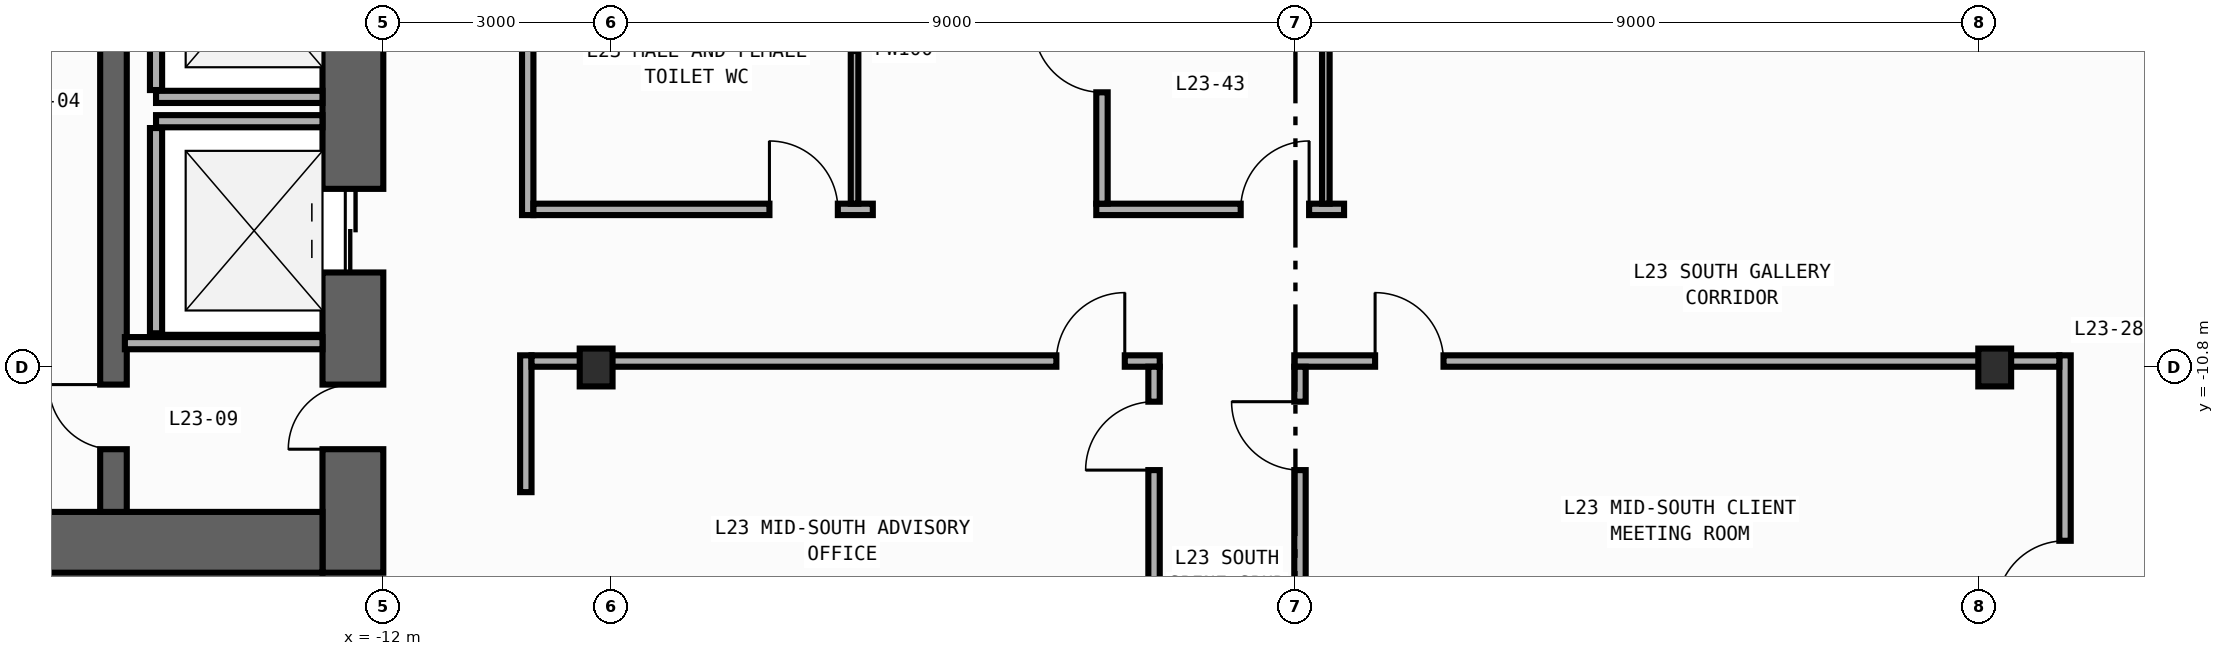
"""IFC4 building model, lengths in metres.
Left out: names, types, materials, properties, quantities, classifications, styles, units other than length and angle.
Written with IfcOpenShell. Run it as: python <this file> out.ifc"""

import sys

from ifc_helpers import new_model, si_unit, direction, frame, frame_2d, origin, origin_2d, place, context, subcontext, project, spatial, rectangle, i_section, extrude, element, fill, save


model = new_model("IFC4")
c1 = context("Model", 3, precision=1e-05, world=origin(), true_north=direction((0.0, 1.0)))
c2 = subcontext(c1, "Body", "Model", "MODEL_VIEW")
j1 = project(units=[si_unit("LENGTHUNIT", "METRE"), si_unit("PLANEANGLEUNIT", "RADIAN")], contexts=[c1])
p1 = place(None, origin())
s1 = spatial("IfcSite", under=j1, at=p1, CompositionType="ELEMENT")
p2 = place(p1, origin())
s2 = spatial("IfcBuilding", under=s1, at=p2, CompositionType="ELEMENT")
p3 = place(p2, frame((0.0, 0.0, 101.6)))
s3 = spatial("IfcBuildingStorey", under=s2, at=p3, CompositionType="ELEMENT", Elevation=101.6)
p4 = place(p3, frame((-12.4, -13.5, 0.0), z_axis=(0.0, 0.0, 1.0), x_axis=(0.0, 1.0, 0.0)))
e1 = element("IfcWall", 1, at=p4, inside=s3, PredefinedType="SHEAR", context=c2, shape_type="SweptSolid", body=[
    extrude(rectangle(XDim=27.0, YDim=0.8, at=frame_2d((13.5, 0.0))), origin(), (0.0, 0.0, 1.0), 3.94),
])
p5 = place(p4, frame((10.35, 0.0, 0.0)))
e2 = element("IfcOpeningElement", 2, at=p5, cuts=e1, PredefinedType="OPENING", context=c2, shape_type="SweptSolid", body=[
    extrude(rectangle(XDim=1.1, YDim=2.2, at=frame_2d((0.55, 1.1))), frame((0.0, 0.41, 0.0), z_axis=(0.0, -1.0, 0.0), x_axis=(1.0, 0.0, 0.0)), (0.0, 0.0, 1.0), 0.82),
])
p6 = place(p4, frame((7.15, 0.0, 0.0)))
e3 = element("IfcOpeningElement", 3, at=p6, cuts=e1, PredefinedType="OPENING", context=c2, shape_type="SweptSolid", body=[
    extrude(rectangle(XDim=1.1, YDim=2.2, at=frame_2d((0.55, 1.1))), frame((0.0, 0.41, 0.0), z_axis=(0.0, -1.0, 0.0), x_axis=(1.0, 0.0, 0.0)), (0.0, 0.0, 1.0), 0.82),
])
p7 = place(p4, frame((3.95, 0.0, 0.0)))
e4 = element("IfcOpeningElement", 4, at=p7, cuts=e1, PredefinedType="OPENING", context=c2, shape_type="SweptSolid", body=[
    extrude(rectangle(XDim=1.1, YDim=2.2, at=frame_2d((0.55, 1.1))), frame((0.0, 0.41, 0.0), z_axis=(0.0, -1.0, 0.0), x_axis=(1.0, 0.0, 0.0)), (0.0, 0.0, 1.0), 0.82),
])
p8 = place(p4, frame((15.175, 0.0, 0.0)))
e5 = element("IfcOpeningElement", 5, at=p8, cuts=e1, PredefinedType="OPENING", context=c2, shape_type="SweptSolid", body=[
    extrude(rectangle(XDim=0.85, YDim=2.1, at=frame_2d((0.425, 1.05))), frame((0.0, 0.41, 0.0), z_axis=(0.0, -1.0, 0.0), x_axis=(1.0, 0.0, 0.0)), (0.0, 0.0, 1.0), 0.82),
])
p9 = place(p4, frame((21.275, 0.0, 0.0)))
e6 = element("IfcOpeningElement", 6, at=p9, cuts=e1, PredefinedType="OPENING", context=c2, shape_type="SweptSolid", body=[
    extrude(rectangle(XDim=0.85, YDim=2.1, at=frame_2d((0.425, 1.05))), frame((0.0, 0.41, 0.0), z_axis=(0.0, -1.0, 0.0), x_axis=(1.0, 0.0, 0.0)), (0.0, 0.0, 1.0), 0.82),
])
p10 = place(p4, frame((12.725, 0.0, 0.0)))
e7 = element("IfcOpeningElement", 7, at=p10, cuts=e1, PredefinedType="OPENING", context=c2, shape_type="SweptSolid", body=[
    extrude(rectangle(XDim=1.15, YDim=2.2, at=frame_2d((0.575, 1.1))), frame((0.0, 0.41, 0.0), z_axis=(0.0, -1.0, 0.0), x_axis=(1.0, 0.0, 0.0)), (0.0, 0.0, 1.0), 0.82),
])
p11 = place(p4, frame((1.625, 0.0, 0.0)))
e8 = element("IfcOpeningElement", 8, at=p11, cuts=e1, PredefinedType="OPENING", context=c2, shape_type="SweptSolid", body=[
    extrude(rectangle(XDim=0.85, YDim=2.1, at=frame_2d((0.425, 1.05))), frame((0.0, 0.41, 0.0), z_axis=(0.0, -1.0, 0.0), x_axis=(1.0, 0.0, 0.0)), (0.0, 0.0, 1.0), 0.82),
])
p12 = place(p3, frame((-19.6, -13.1, 0.0), z_axis=(0.0, 0.0, 1.0), x_axis=(1.0, 0.0, 0.0)))
e9 = element("IfcWall", 9, at=p12, inside=s3, PredefinedType="SHEAR", context=c2, shape_type="SweptSolid", body=[
    extrude(rectangle(XDim=6.8, YDim=0.8, at=frame_2d((3.4, 0.0))), origin(), (0.0, 0.0, 1.0), 3.94),
])
p13 = place(p3, frame((-15.55, -12.7, 0.0), z_axis=(0.0, 0.0, 1.0), x_axis=(0.0, 1.0, 0.0)))
e10 = element("IfcWall", 10, at=p13, inside=s3, PredefinedType="SHEAR", context=c2, shape_type="SweptSolid", body=[
    extrude(rectangle(XDim=25.4, YDim=0.35, at=frame_2d((12.7, 0.0))), origin(), (0.0, 0.0, 1.0), 3.94),
])
p14 = place(p13, frame((11.925, 0.0, 0.0)))
e11 = element("IfcOpeningElement", 11, at=p14, cuts=e10, PredefinedType="OPENING", context=c2, shape_type="SweptSolid", body=[
    extrude(rectangle(XDim=1.15, YDim=2.2, at=frame_2d((0.575, 1.1))), frame((0.0, 0.185, 0.0), z_axis=(0.0, -1.0, 0.0), x_axis=(1.0, 0.0, 0.0)), (0.0, 0.0, 1.0), 0.37),
])
p15 = place(p13, frame((0.825, 0.0, 0.0)))
e12 = element("IfcOpeningElement", 12, at=p15, cuts=e10, PredefinedType="OPENING", context=c2, shape_type="SweptSolid", body=[
    extrude(rectangle(XDim=0.85, YDim=2.1, at=frame_2d((0.425, 1.05))), frame((0.0, 0.185, 0.0), z_axis=(0.0, -1.0, 0.0), x_axis=(1.0, 0.0, 0.0)), (0.0, 0.0, 1.0), 0.37),
])
for number, where, z_axis, x_axis in (
    (13, (-9.2, -10.8, 0.0), (0.0, 0.0, 1.0), (1.0, 0.0, 0.0)),
    (14, (9.2, -10.8, 0.0), (0.0, 0.0, 1.0), (1.0, 0.0, 0.0)),
):
    element("IfcColumn", number, at=place(p3, frame(where, z_axis=z_axis, x_axis=x_axis)), inside=s3, PredefinedType="COLUMN", context=c2, shape_type="SweptSolid", body=[
        extrude(i_section(OverallWidth=0.432, OverallDepth=0.498, WebThickness=0.045, FlangeThickness=0.07, FilletRadius=0.022, at=origin_2d()), origin(), (0.0, 0.0, 1.0), 4.2),
    ])
p16 = place(p3, frame((-14.99, -7.24, 0.0), z_axis=(0.0, 0.0, 1.0), x_axis=(1.0, 0.0, 0.0)))
e15 = element("IfcWall", 15, at=p16, inside=s3, PredefinedType="STANDARD", context=c2, shape_type="SweptSolid", body=[
    extrude(rectangle(XDim=2.19, YDim=0.16, at=frame_2d((1.095, 0.0))), origin(), (0.0, 0.0, 1.0), 3.94),
])
p17 = place(p3, frame((-14.99, -7.15, 0.0), z_axis=(0.0, 0.0, 1.0), x_axis=(0.0, 1.0, 0.0)))
e16 = element("IfcWall", 16, at=p17, inside=s3, PredefinedType="STANDARD", context=c2, shape_type="SweptSolid", body=[
    extrude(rectangle(XDim=2.7, YDim=0.16, at=frame_2d((1.35, 0.0))), origin(), (0.0, 0.0, 1.0), 3.94),
])
p18 = place(p3, frame((-14.99, -7.56, 0.0), z_axis=(0.0, 0.0, 1.0), x_axis=(1.0, 0.0, 0.0)))
e17 = element("IfcWall", 17, at=p18, inside=s3, PredefinedType="STANDARD", context=c2, shape_type="SweptSolid", body=[
    extrude(rectangle(XDim=2.19, YDim=0.16, at=frame_2d((1.095, 0.0))), origin(), (0.0, 0.0, 1.0), 3.94),
])
p19 = place(p3, frame((-14.99, -10.35, 0.0), z_axis=(0.0, 0.0, 1.0), x_axis=(0.0, 1.0, 0.0)))
e18 = element("IfcWall", 18, at=p19, inside=s3, PredefinedType="STANDARD", context=c2, shape_type="SweptSolid", body=[
    extrude(rectangle(XDim=2.7, YDim=0.16, at=frame_2d((1.35, 0.0))), origin(), (0.0, 0.0, 1.0), 3.94),
])
p20 = place(p3, frame((-15.4, -10.48, 0.0), z_axis=(0.0, 0.0, 1.0), x_axis=(1.0, 0.0, 0.0)))
e19 = element("IfcWall", 19, at=p20, inside=s3, PredefinedType="STANDARD", context=c2, shape_type="SweptSolid", body=[
    extrude(rectangle(XDim=2.6, YDim=0.16, at=frame_2d((1.3, 0.0))), origin(), (0.0, 0.0, 1.0), 3.94),
])
p21 = place(p3, frame((-10.1, -8.795, 0.0), z_axis=(0.0, 0.0, 1.0), x_axis=(0.0, 1.0, 0.0)))
e20 = element("IfcWall", 20, at=p21, inside=s3, PredefinedType="PARTITIONING", context=c2, shape_type="SweptSolid", body=[
    extrude(rectangle(XDim=4.275, YDim=0.15, at=frame_2d((2.137, 0.0))), origin(), (0.0, 0.0, 1.0), 3.94),
])
p22 = place(p21, frame((2.915, 0.0, 0.0)))
e21 = element("IfcOpeningElement", 21, at=p22, cuts=e20, PredefinedType="OPENING", context=c2, shape_type="SweptSolid", body=[
    extrude(rectangle(XDim=0.9, YDim=2.15, at=frame_2d((0.45, 1.075))), frame((0.0, 0.085, 0.0), z_axis=(0.0, -1.0, 0.0), x_axis=(1.0, 0.0, 0.0)), (0.0, 0.0, 1.0), 0.17),
])
p23 = place(p3, frame((-10.125, -12.44, 0.0), z_axis=(0.0, 0.0, 1.0), x_axis=(0.0, 1.0, 0.0)))
e22 = element("IfcWall", 22, at=p23, inside=s3, PredefinedType="PARTITIONING", context=c2, shape_type="SweptSolid", body=[
    extrude(rectangle(XDim=1.8, YDim=0.15, at=frame_2d((0.9, 0.0))), origin(), (0.0, 0.0, 1.0), 3.94),
])
p24 = place(p3, frame((10.125, -14.44, 0.0), z_axis=(0.0, 0.0, 1.0), x_axis=(0.0, 1.0, 0.0)))
e23 = element("IfcWall", 23, at=p24, inside=s3, PredefinedType="PARTITIONING", context=c2, shape_type="SweptSolid", body=[
    extrude(rectangle(XDim=3.8, YDim=0.15, at=frame_2d((1.9, 0.0))), origin(), (0.0, 0.0, 1.0), 3.94),
])
p25 = place(p24, frame((0.46, 0.0, 0.0)))
e24 = element("IfcOpeningElement", 24, at=p25, cuts=e23, PredefinedType="OPENING", context=c2, shape_type="SweptSolid", body=[
    extrude(rectangle(XDim=0.9, YDim=2.15, at=frame_2d((0.45, 1.075))), frame((0.0, 0.085, 0.0), z_axis=(0.0, -1.0, 0.0), x_axis=(1.0, 0.0, 0.0)), (0.0, 0.0, 1.0), 0.17),
])
p26 = place(p3, frame((-2.62, -8.72, 0.0), z_axis=(0.0, 0.0, 1.0), x_axis=(1.0, 0.0, 0.0)))
e25 = element("IfcWall", 25, at=p26, inside=s3, PredefinedType="PARTITIONING", context=c2, shape_type="SweptSolid", body=[
    extrude(rectangle(XDim=3.26, YDim=0.15, at=frame_2d((1.63, 0.0))), origin(), (0.0, 0.0, 1.0), 3.94),
])
p27 = place(p26, frame((1.9, 0.0, 0.0)))
e26 = element("IfcOpeningElement", 26, at=p27, cuts=e25, PredefinedType="OPENING", context=c2, shape_type="SweptSolid", body=[
    extrude(rectangle(XDim=0.9, YDim=2.15, at=frame_2d((0.45, 1.075))), frame((0.0, 0.085, 0.0), z_axis=(0.0, -1.0, 0.0), x_axis=(1.0, 0.0, 0.0)), (0.0, 0.0, 1.0), 0.17),
])
p28 = place(p3, frame((-10.025, -8.72, 0.0), z_axis=(0.0, 0.0, 1.0), x_axis=(1.0, 0.0, 0.0)))
e27 = element("IfcWall", 27, at=p28, inside=s3, PredefinedType="PARTITIONING", context=c2, shape_type="SweptSolid", body=[
    extrude(rectangle(XDim=4.465, YDim=0.15, at=frame_2d((2.232, 0.0))), origin(), (0.0, 0.0, 1.0), 3.94),
])
p29 = place(p28, frame((3.105, 0.0, 0.0)))
e28 = element("IfcOpeningElement", 28, at=p29, cuts=e27, PredefinedType="OPENING", context=c2, shape_type="SweptSolid", body=[
    extrude(rectangle(XDim=0.9, YDim=2.15, at=frame_2d((0.45, 1.075))), frame((0.0, 0.085, 0.0), z_axis=(0.0, -1.0, 0.0), x_axis=(1.0, 0.0, 0.0)), (0.0, 0.0, 1.0), 0.17),
])
p30 = place(p3, frame((-10.05, -10.715, 0.0), z_axis=(0.0, 0.0, 1.0), x_axis=(1.0, 0.0, 0.0)))
e29 = element("IfcWall", 29, at=p30, inside=s3, PredefinedType="PARTITIONING", context=c2, shape_type="SweptSolid", body=[
    extrude(rectangle(XDim=8.265, YDim=0.15, at=frame_2d((4.133, 0.0))), origin(), (0.0, 0.0, 1.0), 3.24),
])
p31 = place(p30, frame((6.905, 0.0, 0.0)))
e30 = element("IfcOpeningElement", 30, at=p31, cuts=e29, PredefinedType="OPENING", context=c2, shape_type="SweptSolid", body=[
    extrude(rectangle(XDim=0.9, YDim=2.15, at=frame_2d((0.45, 1.075))), frame((0.0, 0.085, 0.0), z_axis=(0.0, -1.0, 0.0), x_axis=(1.0, 0.0, 0.0)), (0.0, 0.0, 1.0), 0.17),
])
p32 = place(p3, frame((-0.015, -10.715, 0.0), z_axis=(0.0, 0.0, 1.0), x_axis=(1.0, 0.0, 0.0)))
e31 = element("IfcWall", 31, at=p32, inside=s3, PredefinedType="PARTITIONING", context=c2, shape_type="SweptSolid", body=[
    extrude(rectangle(XDim=10.065, YDim=0.15, at=frame_2d((5.032, 0.0))), origin(), (0.0, 0.0, 1.0), 3.24),
])
p33 = place(p32, frame((1.063, 0.0, 0.0)))
e32 = element("IfcOpeningElement", 32, at=p33, cuts=e31, PredefinedType="OPENING", context=c2, shape_type="SweptSolid", body=[
    extrude(rectangle(XDim=0.9, YDim=2.15, at=frame_2d((0.45, 1.075))), frame((0.0, 0.085, 0.0), z_axis=(0.0, -1.0, 0.0), x_axis=(1.0, 0.0, 0.0)), (0.0, 0.0, 1.0), 0.17),
])
p34 = place(p3, frame((-2.545, -8.645, 0.0), z_axis=(0.0, 0.0, 1.0), x_axis=(0.0, 1.0, 0.0)))
e33 = element("IfcWall", 33, at=p34, inside=s3, PredefinedType="PARTITIONING", context=c2, shape_type="SweptSolid", body=[
    extrude(rectangle(XDim=2.825, YDim=0.15, at=frame_2d((1.413, 0.0))), origin(), (0.0, 0.0, 1.0), 3.94),
])
p35 = place(p34, frame((1.465, 0.0, 0.0)))
e34 = element("IfcOpeningElement", 34, at=p35, cuts=e33, PredefinedType="OPENING", context=c2, shape_type="SweptSolid", body=[
    extrude(rectangle(XDim=0.9, YDim=2.15, at=frame_2d((0.45, 1.075))), frame((0.0, 0.085, 0.0), z_axis=(0.0, -1.0, 0.0), x_axis=(1.0, 0.0, 0.0)), (0.0, 0.0, 1.0), 0.17),
])
p36 = place(p3, frame((-1.86, -14.865, 0.0), z_axis=(0.0, 0.0, 1.0), x_axis=(0.0, 1.0, 0.0)))
e35 = element("IfcWall", 35, at=p36, inside=s3, PredefinedType="PARTITIONING", context=c2, shape_type="SweptSolid", body=[
    extrude(rectangle(XDim=4.075, YDim=0.15, at=frame_2d((2.038, 0.0))), origin(), (0.0, 0.0, 1.0), 3.94),
])
p37 = place(p36, frame((2.715, 0.0, 0.0)))
e36 = element("IfcOpeningElement", 36, at=p37, cuts=e35, PredefinedType="OPENING", context=c2, shape_type="SweptSolid", body=[
    extrude(rectangle(XDim=0.9, YDim=2.15, at=frame_2d((0.45, 1.075))), frame((0.0, 0.085, 0.0), z_axis=(0.0, -1.0, 0.0), x_axis=(1.0, 0.0, 0.0)), (0.0, 0.0, 1.0), 0.17),
])
p38 = place(p3, frame((0.06, -14.865, 0.0), z_axis=(0.0, 0.0, 1.0), x_axis=(0.0, 1.0, 0.0)))
e37 = element("IfcWall", 37, at=p38, inside=s3, PredefinedType="PARTITIONING", context=c2, shape_type="SweptSolid", body=[
    extrude(rectangle(XDim=4.075, YDim=0.15, at=frame_2d((2.038, 0.0))), origin(), (0.0, 0.0, 1.0), 3.94),
])
p39 = place(p38, frame((2.715, 0.0, 0.0)))
e38 = element("IfcOpeningElement", 38, at=p39, cuts=e37, PredefinedType="OPENING", context=c2, shape_type="SweptSolid", body=[
    extrude(rectangle(XDim=0.9, YDim=2.15, at=frame_2d((0.45, 1.075))), frame((0.0, 0.085, 0.0), z_axis=(0.0, -1.0, 0.0), x_axis=(1.0, 0.0, 0.0)), (0.0, 0.0, 1.0), 0.17),
])
p40 = place(p3, frame((0.4, -5.89, 0.0), z_axis=(0.0, 0.0, 1.0), x_axis=(0.0, -1.0, 0.0)))
e39 = element("IfcWall", 39, at=p40, inside=s3, PredefinedType="PARTITIONING", context=c2, shape_type="SweptSolid", body=[
    extrude(rectangle(XDim=2.755, YDim=0.1, at=frame_2d((1.377, 0.0))), origin(), (0.0, 0.0, 1.0), 3.94),
])
p41 = place(p3, frame((-5.8, -4.59, 0.0), z_axis=(0.0, 0.0, 1.0), x_axis=(0.0, -1.0, 0.0)))
e40 = element("IfcWall", 40, at=p41, inside=s3, PredefinedType="PARTITIONING", context=c2, shape_type="SweptSolid", body=[
    extrude(rectangle(XDim=4.055, YDim=0.1, at=frame_2d((2.027, 0.0))), origin(), (0.0, 0.0, 1.0), 3.94),
])
p42 = place(p7, origin())
e41 = element("IfcDoor", 41, at=p42, inside=s3, OperationType="DOUBLE_DOOR_SLIDING", PredefinedType="DOOR", context=c2, shape_type="SweptSolid", body=[
    extrude(rectangle(XDim=1.1, YDim=2.2, at=frame_2d((0.55, 1.1))), frame((0.0, 0.025, 0.0), z_axis=(0.0, -1.0, 0.0), x_axis=(1.0, 0.0, 0.0)), (0.0, 0.0, 1.0), 0.05),
])
fill(e4, e41)
p43 = place(p11, origin())
e42 = element("IfcDoor", 42, at=p43, inside=s3, OperationType="SINGLE_SWING_LEFT", PredefinedType="DOOR", context=c2, shape_type="SweptSolid", body=[
    extrude(rectangle(XDim=0.85, YDim=2.1, at=frame_2d((0.425, 1.05))), frame((0.0, 0.025, 0.0), z_axis=(0.0, -1.0, 0.0), x_axis=(1.0, 0.0, 0.0)), (0.0, 0.0, 1.0), 0.05),
])
fill(e8, e42)
p44 = place(p15, origin())
e43 = element("IfcDoor", 43, at=p44, inside=s3, OperationType="SINGLE_SWING_RIGHT", PredefinedType="DOOR", context=c2, shape_type="SweptSolid", body=[
    extrude(rectangle(XDim=0.85, YDim=2.1, at=frame_2d((0.425, 1.05))), frame((0.0, 0.025, 0.0), z_axis=(0.0, -1.0, 0.0), x_axis=(1.0, 0.0, 0.0)), (0.0, 0.0, 1.0), 0.05),
])
fill(e12, e43)
p45 = place(p25, origin())
e44 = element("IfcDoor", 44, at=p45, inside=s3, OperationType="SINGLE_SWING_LEFT", PredefinedType="DOOR", context=c2, shape_type="SweptSolid", body=[
    extrude(rectangle(XDim=0.9, YDim=2.15, at=frame_2d((0.45, 1.075))), frame((0.0, 0.025, 0.0), z_axis=(0.0, -1.0, 0.0), x_axis=(1.0, 0.0, 0.0)), (0.0, 0.0, 1.0), 0.05),
])
fill(e24, e44)
p46 = place(p27, origin())
e45 = element("IfcDoor", 45, at=p46, inside=s3, OperationType="SINGLE_SWING_RIGHT", PredefinedType="DOOR", context=c2, shape_type="SweptSolid", body=[
    extrude(rectangle(XDim=0.9, YDim=2.15, at=frame_2d((0.45, 1.075))), frame((0.0, 0.025, 0.0), z_axis=(0.0, -1.0, 0.0), x_axis=(1.0, 0.0, 0.0)), (0.0, 0.0, 1.0), 0.05),
])
fill(e26, e45)
p47 = place(p29, origin())
e46 = element("IfcDoor", 46, at=p47, inside=s3, OperationType="SINGLE_SWING_LEFT", PredefinedType="DOOR", context=c2, shape_type="SweptSolid", body=[
    extrude(rectangle(XDim=0.9, YDim=2.15, at=frame_2d((0.45, 1.075))), frame((0.0, 0.025, 0.0), z_axis=(0.0, -1.0, 0.0), x_axis=(1.0, 0.0, 0.0)), (0.0, 0.0, 1.0), 0.05),
])
fill(e28, e46)
p48 = place(p31, origin())
e47 = element("IfcDoor", 47, at=p48, inside=s3, OperationType="SINGLE_SWING_RIGHT", PredefinedType="DOOR", context=c2, shape_type="SweptSolid", body=[
    extrude(rectangle(XDim=0.9, YDim=2.15, at=frame_2d((0.45, 1.075))), frame((0.0, 0.025, 0.0), z_axis=(0.0, -1.0, 0.0), x_axis=(1.0, 0.0, 0.0)), (0.0, 0.0, 1.0), 0.05),
])
fill(e30, e47)
p49 = place(p33, origin())
e48 = element("IfcDoor", 48, at=p49, inside=s3, OperationType="SINGLE_SWING_LEFT", PredefinedType="DOOR", context=c2, shape_type="SweptSolid", body=[
    extrude(rectangle(XDim=0.9, YDim=2.15, at=frame_2d((0.45, 1.075))), frame((0.0, 0.025, 0.0), z_axis=(0.0, -1.0, 0.0), x_axis=(1.0, 0.0, 0.0)), (0.0, 0.0, 1.0), 0.05),
])
fill(e32, e48)
p50 = place(p35, origin())
e49 = element("IfcDoor", 49, at=p50, inside=s3, OperationType="SINGLE_SWING_RIGHT", PredefinedType="DOOR", context=c2, shape_type="SweptSolid", body=[
    extrude(rectangle(XDim=0.9, YDim=2.15, at=frame_2d((0.45, 1.075))), frame((0.0, 0.025, 0.0), z_axis=(0.0, -1.0, 0.0), x_axis=(1.0, 0.0, 0.0)), (0.0, 0.0, 1.0), 0.05),
])
fill(e34, e49)
p51 = place(p37, origin())
e50 = element("IfcDoor", 50, at=p51, inside=s3, OperationType="SINGLE_SWING_LEFT", PredefinedType="DOOR", context=c2, shape_type="SweptSolid", body=[
    extrude(rectangle(XDim=0.9, YDim=2.15, at=frame_2d((0.45, 1.075))), frame((0.0, 0.025, 0.0), z_axis=(0.0, -1.0, 0.0), x_axis=(1.0, 0.0, 0.0)), (0.0, 0.0, 1.0), 0.05),
])
fill(e36, e50)
p52 = place(p39, origin())
e51 = element("IfcDoor", 51, at=p52, inside=s3, OperationType="SINGLE_SWING_RIGHT", PredefinedType="DOOR", context=c2, shape_type="SweptSolid", body=[
    extrude(rectangle(XDim=0.9, YDim=2.15, at=frame_2d((0.45, 1.075))), frame((0.0, 0.025, 0.0), z_axis=(0.0, -1.0, 0.0), x_axis=(1.0, 0.0, 0.0)), (0.0, 0.0, 1.0), 0.05),
])
fill(e38, e51)
save(model, sys.argv[1])
